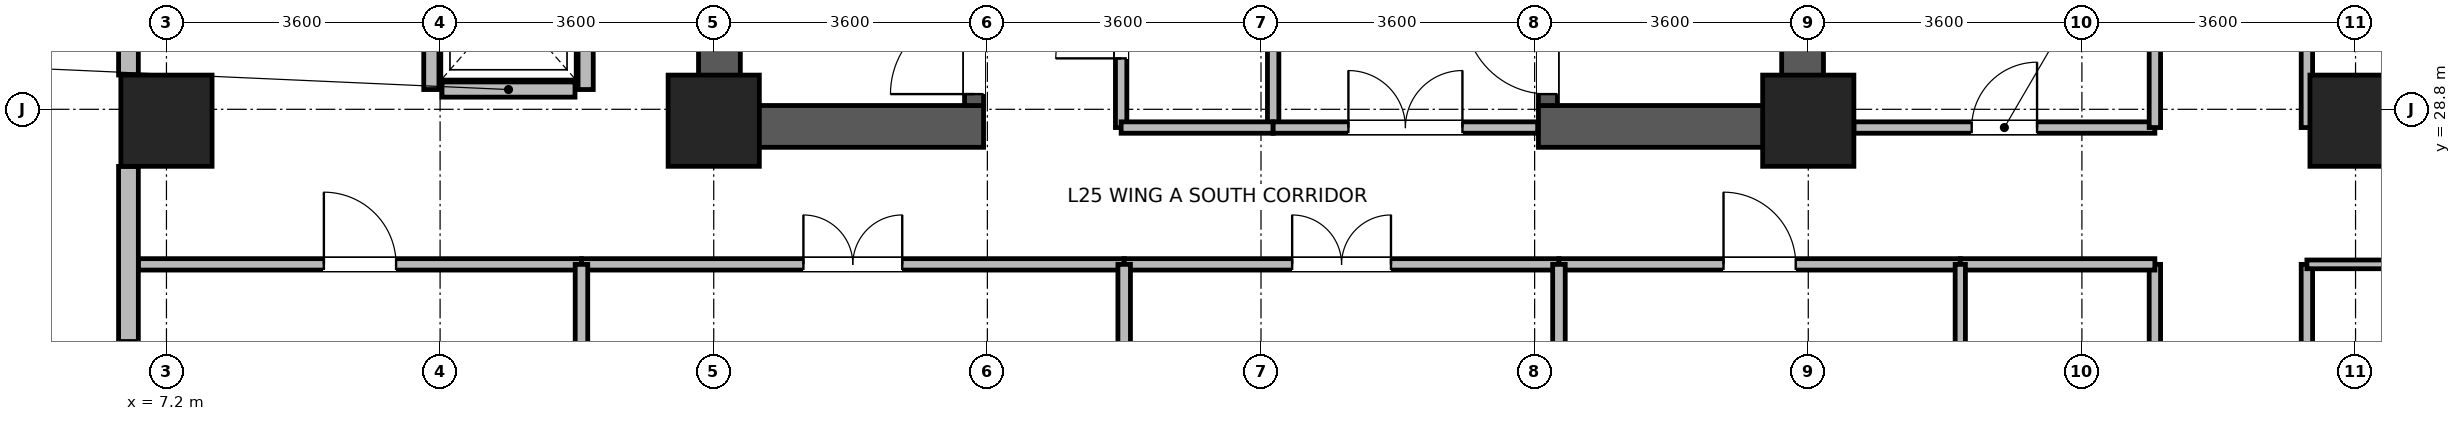
"""IFC4 building model, lengths in metres.
Left out: names, types, materials, properties, quantities, classifications, styles, units other than length and angle.
Written with IfcOpenShell. Run it as: python <this file> out.ifc"""

import sys

from ifc_helpers import new_model, si_unit, direction, frame, frame_2d, origin, origin_2d, place, context, subcontext, project, spatial, rectangle, extrude, source, transform, mapped, element, fill, save


model = new_model("IFC4")
c1 = context("Model", 3, precision=1e-05, world=origin(), true_north=direction((0.0, 1.0)))
c2 = subcontext(c1, "Body", "Model", "MODEL_VIEW")
j1 = project(units=[si_unit("LENGTHUNIT", "METRE"), si_unit("PLANEANGLEUNIT", "RADIAN")], contexts=[c1])
p1 = place(None, origin())
s1 = spatial("IfcSite", under=j1, at=p1, CompositionType="ELEMENT")
p2 = place(p1, origin())
s2 = spatial("IfcBuilding", under=s1, at=p2, CompositionType="ELEMENT")
p3 = place(p2, frame((0.0, 0.0, 100.8)))
s3 = spatial("IfcBuildingStorey", under=s2, at=p3, CompositionType="ELEMENT", Elevation=100.8)
for number, where, z_axis, x_axis in (
    (1, (14.475, 28.3, 0.0), (0.0, 0.0, 1.0), (0.0, 1.0, 0.0)),
    (2, (28.725, 28.3, 0.0), (0.0, 0.0, 1.0), (0.0, 1.0, 0.0)),
):
    element("IfcWall", number, at=place(p3, frame(where, z_axis=z_axis, x_axis=x_axis)), inside=s3, PredefinedType="SHEAR", context=c2, shape_type="SweptSolid", body=[
        extrude(rectangle(XDim=8.1, YDim=0.55, at=frame_2d((4.05, 0.0))), origin(), (0.0, 0.0, 1.0), 3.45),
    ])
for number, where, z_axis, x_axis in (
    (3, (14.75, 28.575, 0.0), (0.0, 0.0, 1.0), (1.0, 0.0, 0.0)),
    (4, (25.25, 28.575, 0.0), (0.0, 0.0, 1.0), (1.0, 0.0, 0.0)),
):
    element("IfcWall", number, at=place(p3, frame(where, z_axis=z_axis, x_axis=x_axis)), inside=s3, PredefinedType="SHEAR", context=c2, shape_type="SweptSolid", body=[
        extrude(rectangle(XDim=3.2, YDim=0.55, at=frame_2d((1.6, 0.0))), origin(), (0.0, 0.0, 1.0), 3.45),
    ])
p4 = place(p3, frame((17.825, 28.85, 0.0), z_axis=(0.0, 0.0, 1.0), x_axis=(0.0, 1.0, 0.0)))
e5 = element("IfcWall", 5, at=p4, inside=s3, PredefinedType="SHEAR", context=c2, shape_type="SweptSolid", body=[
    extrude(rectangle(XDim=7.0, YDim=0.25, at=frame_2d((3.5, 0.0))), origin(), (0.0, 0.0, 1.0), 3.45),
])
p5 = place(p4, frame((0.15, 0.0, 0.0)))
e6 = element("IfcOpeningElement", 6, at=p5, cuts=e5, PredefinedType="OPENING", context=c2, shape_type="SweptSolid", body=[
    extrude(rectangle(XDim=1.1, YDim=2.08, at=frame_2d((0.55, 1.04))), frame((0.0, 0.135, 0.0), z_axis=(0.0, -1.0, 0.0), x_axis=(1.0, 0.0, 0.0)), (0.0, 0.0, 1.0), 0.27),
])
p6 = place(p3, frame((25.375, 28.85, 0.0), z_axis=(0.0, 0.0, 1.0), x_axis=(0.0, 1.0, 0.0)))
e7 = element("IfcWall", 7, at=p6, inside=s3, PredefinedType="SHEAR", context=c2, shape_type="SweptSolid", body=[
    extrude(rectangle(XDim=7.0, YDim=0.25, at=frame_2d((3.5, 0.0))), origin(), (0.0, 0.0, 1.0), 3.45),
])
p7 = place(p6, frame((0.15, 0.0, 0.0)))
e8 = element("IfcOpeningElement", 8, at=p7, cuts=e7, PredefinedType="OPENING", context=c2, shape_type="SweptSolid", body=[
    extrude(rectangle(XDim=1.1, YDim=2.08, at=frame_2d((0.55, 1.04))), frame((0.0, 0.135, 0.0), z_axis=(0.0, -1.0, 0.0), x_axis=(1.0, 0.0, 0.0)), (0.0, 0.0, 1.0), 0.27),
])
m1 = source(origin(), c2, "Body", "SweptSolid", [
    extrude(rectangle(XDim=1.2, YDim=1.2, at=origin_2d()), origin(), (0.0, 0.0, 1.0), 3.7),
])
for number, where, z_axis, x_axis in (
    (9, (7.2, 28.65, 0.0), (0.0, 0.0, 1.0), (1.0, 0.0, 0.0)),
    (10, (14.4, 28.65, 0.0), (0.0, 0.0, 1.0), (1.0, 0.0, 0.0)),
    (11, (28.8, 28.65, 0.0), (0.0, 0.0, 1.0), (1.0, 0.0, 0.0)),
    (12, (36.0, 28.65, 0.0), (0.0, 0.0, 1.0), (1.0, 0.0, 0.0)),
):
    element("IfcColumn", number, at=place(p3, frame(where, z_axis=z_axis, x_axis=x_axis)), inside=s3, PredefinedType="COLUMN", context=c2, shape_type="MappedRepresentation", body=[
        mapped(m1, transform((0.0, 0.0, 0.0), x_axis=(1.0, 0.0, 0.0), y_axis=(0.0, 1.0, 0.0), z_axis=(0.0, 0.0, 1.0), scale=1.0)),
    ])
p8 = place(p3, frame((6.7, 29.251, 0.0), z_axis=(0.0, 0.0, 1.0), x_axis=(0.0, 1.0, 0.0)))
e13 = element("IfcWall", 13, at=p8, inside=s3, PredefinedType="STANDARD", context=c2, shape_type="SweptSolid", body=[
    extrude(rectangle(XDim=6.298, YDim=0.26, at=frame_2d((3.149, 0.0))), origin(), (0.0, 0.0, 1.0), 3.43),
])
p9 = place(p8, frame((0.675, 0.0, 0.85)))
e14 = element("IfcOpeningElement", 14, at=p9, cuts=e13, PredefinedType="OPENING", context=c2, shape_type="SweptSolid", body=[
    extrude(rectangle(XDim=1.8, YDim=1.85, at=frame_2d((0.9, 0.925))), frame((0.0, 0.14, 0.0), z_axis=(0.0, -1.0, 0.0), x_axis=(1.0, 0.0, 0.0)), (0.0, 0.0, 1.0), 0.28),
])
p10 = place(p8, frame((3.823, 0.0, 0.85)))
e15 = element("IfcOpeningElement", 15, at=p10, cuts=e13, PredefinedType="OPENING", context=c2, shape_type="SweptSolid", body=[
    extrude(rectangle(XDim=1.8, YDim=1.85, at=frame_2d((0.9, 0.925))), frame((0.0, 0.14, 0.0), z_axis=(0.0, -1.0, 0.0), x_axis=(1.0, 0.0, 0.0)), (0.0, 0.0, 1.0), 0.28),
])
p11 = place(p3, frame((6.7, 21.47, 0.0), z_axis=(0.0, 0.0, 1.0), x_axis=(0.0, 1.0, 0.0)))
e16 = element("IfcWall", 16, at=p11, inside=s3, PredefinedType="STANDARD", context=c2, shape_type="SweptSolid", body=[
    extrude(rectangle(XDim=6.579, YDim=0.26, at=frame_2d((3.29, 0.0))), origin(), (0.0, 0.0, 1.0), 3.43),
])
p12 = place(p11, frame((0.745, 0.0, 0.85)))
e17 = element("IfcOpeningElement", 17, at=p12, cuts=e16, PredefinedType="OPENING", context=c2, shape_type="SweptSolid", body=[
    extrude(rectangle(XDim=1.8, YDim=1.85, at=frame_2d((0.9, 0.925))), frame((0.0, 0.14, 0.0), z_axis=(0.0, -1.0, 0.0), x_axis=(1.0, 0.0, 0.0)), (0.0, 0.0, 1.0), 0.28),
])
p13 = place(p11, frame((3.341, 0.0, 0.85)))
e18 = element("IfcOpeningElement", 18, at=p13, cuts=e16, PredefinedType="OPENING", context=c2, shape_type="SweptSolid", body=[
    extrude(rectangle(XDim=0.95, YDim=1.75, at=frame_2d((0.475, 0.875))), frame((0.0, 0.14, 0.0), z_axis=(0.0, -1.0, 0.0), x_axis=(1.0, 0.0, 0.0)), (0.0, 0.0, 1.0), 0.28),
])
p14 = place(p3, frame((10.825, 29.06, 0.0), z_axis=(0.0, 0.0, 1.0), x_axis=(1.0, 0.0, 0.0)))
e19 = element("IfcWall", 19, at=p14, inside=s3, PredefinedType="PARTITIONING", context=c2, shape_type="SweptSolid", body=[
    extrude(rectangle(XDim=1.75, YDim=0.2, at=frame_2d((0.875, 0.0))), origin(), (0.0, 0.0, 1.0), 3.43),
])
for number, where, z_axis, x_axis in (
    (20, (10.685, 29.06, 0.0), (0.0, 0.0, 1.0), (0.0, 1.0, 0.0)),
    (21, (12.715, 29.06, 0.0), (0.0, 0.0, 1.0), (0.0, 1.0, 0.0)),
):
    element("IfcWall", number, at=place(p3, frame(where, z_axis=z_axis, x_axis=x_axis)), inside=s3, PredefinedType="PARTITIONING", context=c2, shape_type="SweptSolid", body=[
        extrude(rectangle(XDim=2.28, YDim=0.2, at=frame_2d((1.14, 0.0))), origin(), (0.0, 0.0, 1.0), 3.43),
    ])
p15 = place(p3, frame((35.36, 16.96, 0.0), z_axis=(0.0, 0.0, 1.0), x_axis=(0.0, 1.0, 0.0)))
e22 = element("IfcWall", 22, at=p15, inside=s3, PredefinedType="PARTITIONING", context=c2, shape_type="SweptSolid", body=[
    extrude(rectangle(XDim=9.8, YDim=0.15, at=frame_2d((4.9, 0.0))), origin(), (0.0, 0.0, 1.0), 3.43),
])
p16 = place(p15, frame((2.486, 0.0, 0.0)))
e23 = element("IfcOpeningElement", 23, at=p16, cuts=e22, PredefinedType="OPENING", context=c2, shape_type="SweptSolid", body=[
    extrude(rectangle(XDim=1.3, YDim=2.12, at=frame_2d((0.65, 1.06))), frame((0.0, 0.085, 0.0), z_axis=(0.0, -1.0, 0.0), x_axis=(1.0, 0.0, 0.0)), (0.0, 0.0, 1.0), 0.17),
])
p17 = place(p3, frame((35.36, 28.56, 0.0), z_axis=(0.0, 0.0, 1.0), x_axis=(0.0, 1.0, 0.0)))
e24 = element("IfcWall", 24, at=p17, inside=s3, PredefinedType="PARTITIONING", context=c2, shape_type="SweptSolid", body=[
    extrude(rectangle(XDim=7.68, YDim=0.15, at=frame_2d((3.84, 0.0))), origin(), (0.0, 0.0, 1.0), 3.43),
])
p18 = place(p17, frame((3.19, 0.0, 0.0)))
e25 = element("IfcOpeningElement", 25, at=p18, cuts=e24, PredefinedType="OPENING", context=c2, shape_type="SweptSolid", body=[
    extrude(rectangle(XDim=1.3, YDim=2.12, at=frame_2d((0.65, 1.06))), frame((0.0, 0.085, 0.0), z_axis=(0.0, -1.0, 0.0), x_axis=(1.0, 0.0, 0.0)), (0.0, 0.0, 1.0), 0.17),
])
p19 = place(p3, frame((12.66, 26.76, 0.0), z_axis=(0.0, 0.0, 1.0), x_axis=(1.0, 0.0, 0.0)))
e26 = element("IfcWall", 26, at=p19, inside=s3, PredefinedType="PARTITIONING", context=c2, shape_type="SweptSolid", body=[
    extrude(rectangle(XDim=7.14, YDim=0.15, at=frame_2d((3.57, 0.0))), origin(), (0.0, 0.0, 1.0), 3.43),
])
p20 = place(p19, frame((2.92, 0.0, 0.0)))
e27 = element("IfcOpeningElement", 27, at=p20, cuts=e26, PredefinedType="OPENING", context=c2, shape_type="SweptSolid", body=[
    extrude(rectangle(XDim=1.3, YDim=2.12, at=frame_2d((0.65, 1.06))), frame((0.0, 0.085, 0.0), z_axis=(0.0, -1.0, 0.0), x_axis=(1.0, 0.0, 0.0)), (0.0, 0.0, 1.0), 0.17),
])
p21 = place(p3, frame((6.832, 26.76, 0.0), z_axis=(0.0, 0.0, 1.0), x_axis=(1.0, 0.0, 0.0)))
e28 = element("IfcWall", 28, at=p21, inside=s3, PredefinedType="PARTITIONING", context=c2, shape_type="SweptSolid", body=[
    extrude(rectangle(XDim=5.828, YDim=0.15, at=frame_2d((2.914, 0.0))), origin(), (0.0, 0.0, 1.0), 3.43),
])
p22 = place(p21, frame((2.439, 0.0, 0.0)))
e29 = element("IfcOpeningElement", 29, at=p22, cuts=e28, PredefinedType="OPENING", context=c2, shape_type="SweptSolid", body=[
    extrude(rectangle(XDim=0.95, YDim=2.1, at=frame_2d((0.475, 1.05))), frame((0.0, 0.085, 0.0), z_axis=(0.0, -1.0, 0.0), x_axis=(1.0, 0.0, 0.0)), (0.0, 0.0, 1.0), 0.17),
])
p23 = place(p3, frame((19.8, 26.76, 0.0), z_axis=(0.0, 0.0, 1.0), x_axis=(1.0, 0.0, 0.0)))
e30 = element("IfcWall", 30, at=p23, inside=s3, PredefinedType="PARTITIONING", context=c2, shape_type="SweptSolid", body=[
    extrude(rectangle(XDim=5.72, YDim=0.15, at=frame_2d((2.86, 0.0))), origin(), (0.0, 0.0, 1.0), 3.43),
])
p24 = place(p23, frame((2.21, 0.0, 0.0)))
e31 = element("IfcOpeningElement", 31, at=p24, cuts=e30, PredefinedType="OPENING", context=c2, shape_type="SweptSolid", body=[
    extrude(rectangle(XDim=1.3, YDim=2.12, at=frame_2d((0.65, 1.06))), frame((0.0, 0.085, 0.0), z_axis=(0.0, -1.0, 0.0), x_axis=(1.0, 0.0, 0.0)), (0.0, 0.0, 1.0), 0.17),
])
p25 = place(p3, frame((25.52, 26.76, 0.0), z_axis=(0.0, 0.0, 1.0), x_axis=(1.0, 0.0, 0.0)))
e32 = element("IfcWall", 32, at=p25, inside=s3, PredefinedType="PARTITIONING", context=c2, shape_type="SweptSolid", body=[
    extrude(rectangle(XDim=5.28, YDim=0.15, at=frame_2d((2.64, 0.0))), origin(), (0.0, 0.0, 1.0), 3.43),
])
p26 = place(p25, frame((2.165, 0.0, 0.0)))
e33 = element("IfcOpeningElement", 33, at=p26, cuts=e32, PredefinedType="OPENING", context=c2, shape_type="SweptSolid", body=[
    extrude(rectangle(XDim=0.95, YDim=2.1, at=frame_2d((0.475, 1.05))), frame((0.0, 0.085, 0.0), z_axis=(0.0, -1.0, 0.0), x_axis=(1.0, 0.0, 0.0)), (0.0, 0.0, 1.0), 0.17),
])
p27 = place(p3, frame((33.36, 21.6, 0.0), z_axis=(0.0, 0.0, 1.0), x_axis=(0.0, 1.0, 0.0)))
e34 = element("IfcWall", 34, at=p27, inside=s3, PredefinedType="PARTITIONING", context=c2, shape_type="SweptSolid", body=[
    extrude(rectangle(XDim=5.16, YDim=0.15, at=frame_2d((2.58, 0.0))), origin(), (0.0, 0.0, 1.0), 3.43),
])
p28 = place(p27, frame((2.155, 0.0, 0.0)))
e35 = element("IfcOpeningElement", 35, at=p28, cuts=e34, PredefinedType="OPENING", context=c2, shape_type="SweptSolid", body=[
    extrude(rectangle(XDim=0.85, YDim=2.04, at=frame_2d((0.425, 1.02))), frame((0.0, 0.085, 0.0), z_axis=(0.0, -1.0, 0.0), x_axis=(1.0, 0.0, 0.0)), (0.0, 0.0, 1.0), 0.17),
])
p29 = place(p3, frame((29.4, 28.56, 0.0), z_axis=(0.0, 0.0, 1.0), x_axis=(1.0, 0.0, 0.0)))
e36 = element("IfcWall", 36, at=p29, inside=s3, PredefinedType="PARTITIONING", context=c2, shape_type="SweptSolid", body=[
    extrude(rectangle(XDim=3.96, YDim=0.15, at=frame_2d((1.98, 0.0))), origin(), (0.0, 0.0, 1.0), 2.78),
])
p30 = place(p29, frame((1.55, 0.0, 0.0)))
e37 = element("IfcOpeningElement", 37, at=p30, cuts=e36, PredefinedType="OPENING", context=c2, shape_type="SweptSolid", body=[
    extrude(rectangle(XDim=0.86, YDim=2.02, at=frame_2d((0.43, 1.01))), frame((0.0, 0.085, 0.0), z_axis=(0.0, -1.0, 0.0), x_axis=(1.0, 0.0, 0.0)), (0.0, 0.0, 1.0), 0.17),
])
p31 = place(p3, frame((33.36, 28.56, 0.0), z_axis=(0.0, 0.0, 1.0), x_axis=(0.0, 1.0, 0.0)))
e38 = element("IfcWall", 38, at=p31, inside=s3, PredefinedType="PARTITIONING", context=c2, shape_type="SweptSolid", body=[
    extrude(rectangle(XDim=3.08, YDim=0.15, at=frame_2d((1.54, 0.0))), origin(), (0.0, 0.0, 1.0), 3.43),
])
p32 = place(p3, frame((19.76, 28.56, 0.0), z_axis=(0.0, 0.0, 1.0), x_axis=(0.0, 1.0, 0.0)))
e39 = element("IfcWall", 39, at=p32, inside=s3, PredefinedType="PARTITIONING", context=c2, shape_type="SweptSolid", body=[
    extrude(rectangle(XDim=2.68, YDim=0.15, at=frame_2d((1.34, 0.0))), origin(), (0.0, 0.0, 1.0), 3.43),
])
p33 = place(p32, frame((0.91, 0.0, 0.0)))
e40 = element("IfcOpeningElement", 40, at=p33, cuts=e39, PredefinedType="OPENING", context=c2, shape_type="SweptSolid", body=[
    extrude(rectangle(XDim=0.86, YDim=2.02, at=frame_2d((0.43, 1.01))), frame((0.0, 0.085, 0.0), z_axis=(0.0, -1.0, 0.0), x_axis=(1.0, 0.0, 0.0)), (0.0, 0.0, 1.0), 0.17),
])
p34 = place(p3, frame((21.76, 28.56, 0.0), z_axis=(0.0, 0.0, 1.0), x_axis=(0.0, 1.0, 0.0)))
e41 = element("IfcWall", 41, at=p34, inside=s3, PredefinedType="PARTITIONING", context=c2, shape_type="SweptSolid", body=[
    extrude(rectangle(XDim=2.68, YDim=0.15, at=frame_2d((1.34, 0.0))), origin(), (0.0, 0.0, 1.0), 3.43),
])
p35 = place(p3, frame((30.8, 26.76, 0.0), z_axis=(0.0, 0.0, 1.0), x_axis=(1.0, 0.0, 0.0)))
e42 = element("IfcWall", 42, at=p35, inside=s3, PredefinedType="PARTITIONING", context=c2, shape_type="SweptSolid", body=[
    extrude(rectangle(XDim=2.56, YDim=0.15, at=frame_2d((1.28, 0.0))), origin(), (0.0, 0.0, 1.0), 3.43),
])
p36 = place(p3, frame((19.76, 28.56, 0.0), z_axis=(0.0, 0.0, 1.0), x_axis=(1.0, 0.0, 0.0)))
e43 = element("IfcWall", 43, at=p36, inside=s3, PredefinedType="PARTITIONING", context=c2, shape_type="SweptSolid", body=[
    extrude(rectangle(XDim=2.0, YDim=0.15, at=frame_2d((1.0, 0.0))), origin(), (0.0, 0.0, 1.0), 2.43),
])
p37 = place(p3, frame((35.36, 26.76, 0.0), z_axis=(0.0, 0.0, 1.0), x_axis=(1.0, 0.0, 0.0)))
e44 = element("IfcWall", 44, at=p37, inside=s3, PredefinedType="PARTITIONING", context=c2, shape_type="SweptSolid", body=[
    extrude(rectangle(XDim=5.86, YDim=0.115, at=frame_2d((2.93, 0.0))), origin(), (0.0, 0.0, 1.0), 3.43),
])
for number, where, z_axis, x_axis in (
    (45, (19.8, 21.732, 0.0), (0.0, 0.0, 1.0), (0.0, 1.0, 0.0)),
    (46, (25.52, 21.732, 0.0), (0.0, 0.0, 1.0), (0.0, 1.0, 0.0)),
):
    element("IfcWall", number, at=place(p3, frame(where, z_axis=z_axis, x_axis=x_axis)), inside=s3, PredefinedType="PARTITIONING", context=c2, shape_type="SweptSolid", body=[
        extrude(rectangle(XDim=5.028, YDim=0.165, at=frame_2d((2.514, 0.0))), origin(), (0.0, 0.0, 1.0), 3.43),
    ])
p38 = place(p3, frame((30.8, 21.732, 0.0), z_axis=(0.0, 0.0, 1.0), x_axis=(0.0, 1.0, 0.0)))
e47 = element("IfcWall", 47, at=p38, inside=s3, PredefinedType="PARTITIONING", context=c2, shape_type="SweptSolid", body=[
    extrude(rectangle(XDim=5.028, YDim=0.135, at=frame_2d((2.514, 0.0))), origin(), (0.0, 0.0, 1.0), 3.43),
])
p39 = place(p3, frame((21.76, 28.56, 0.0), z_axis=(0.0, 0.0, 1.0), x_axis=(1.0, 0.0, 0.0)))
e48 = element("IfcWall", 48, at=p39, inside=s3, PredefinedType="PARTITIONING", context=c2, shape_type="SweptSolid", body=[
    extrude(rectangle(XDim=3.48, YDim=0.15, at=frame_2d((1.74, 0.0))), origin(), (0.0, 0.0, 1.0), 2.43),
])
p40 = place(p39, frame((0.99, 0.0, 0.0)))
e49 = element("IfcOpeningElement", 49, at=p40, cuts=e48, PredefinedType="OPENING", context=c2, shape_type="SweptSolid", body=[
    extrude(rectangle(XDim=1.5, YDim=2.1, at=frame_2d((0.75, 1.05))), frame((0.0, 0.085, 0.0), z_axis=(0.0, -1.0, 0.0), x_axis=(1.0, 0.0, 0.0)), (0.0, 0.0, 1.0), 0.17),
])
p41 = place(p3, frame((12.66, 23.5, 0.0), z_axis=(0.0, 0.0, 1.0), x_axis=(0.0, 1.0, 0.0)))
e50 = element("IfcWall", 50, at=p41, inside=s3, PredefinedType="PARTITIONING", context=c2, shape_type="SweptSolid", body=[
    extrude(rectangle(XDim=3.26, YDim=0.165, at=frame_2d((1.63, 0.0))), origin(), (0.0, 0.0, 1.0), 3.43),
])
p42 = place(p13, origin())
e51 = element("IfcWindow", 51, at=p42, inside=s3, PartitioningType="SINGLE_PANEL", PredefinedType="WINDOW", context=c2, shape_type="SweptSolid", body=[
    extrude(rectangle(XDim=0.95, YDim=1.75, at=frame_2d((0.475, 0.875))), frame((0.0, 0.03, 0.0), z_axis=(0.0, -1.0, 0.0), x_axis=(1.0, 0.0, 0.0)), (0.0, 0.0, 1.0), 0.06),
])
fill(e18, e51)
p43 = place(p5, origin())
e52 = element("IfcDoor", 52, at=p43, inside=s3, OperationType="SINGLE_SWING_LEFT", PredefinedType="DOOR", context=c2, shape_type="SweptSolid", body=[
    extrude(rectangle(XDim=1.1, YDim=2.08, at=frame_2d((0.55, 1.04))), frame((0.0, 0.025, 0.0), z_axis=(0.0, -1.0, 0.0), x_axis=(1.0, 0.0, 0.0)), (0.0, 0.0, 1.0), 0.05),
])
fill(e6, e52)
p44 = place(p7, origin())
e53 = element("IfcDoor", 53, at=p44, inside=s3, OperationType="SINGLE_SWING_RIGHT", PredefinedType="DOOR", context=c2, shape_type="SweptSolid", body=[
    extrude(rectangle(XDim=1.1, YDim=2.08, at=frame_2d((0.55, 1.04))), frame((0.0, 0.025, 0.0), z_axis=(0.0, -1.0, 0.0), x_axis=(1.0, 0.0, 0.0)), (0.0, 0.0, 1.0), 0.05),
])
fill(e8, e53)
p45 = place(p20, origin())
e54 = element("IfcDoor", 54, at=p45, inside=s3, OperationType="DOUBLE_DOOR_SINGLE_SWING", PredefinedType="DOOR", context=c2, shape_type="SweptSolid", body=[
    extrude(rectangle(XDim=1.3, YDim=2.12, at=frame_2d((0.65, 1.06))), frame((0.0, 0.025, 0.0), z_axis=(0.0, -1.0, 0.0), x_axis=(1.0, 0.0, 0.0)), (0.0, 0.0, 1.0), 0.05),
])
fill(e27, e54)
p46 = place(p22, origin())
e55 = element("IfcDoor", 55, at=p46, inside=s3, OperationType="SINGLE_SWING_LEFT", PredefinedType="DOOR", context=c2, shape_type="SweptSolid", body=[
    extrude(rectangle(XDim=0.95, YDim=2.1, at=frame_2d((0.475, 1.05))), frame((0.0, 0.025, 0.0), z_axis=(0.0, -1.0, 0.0), x_axis=(1.0, 0.0, 0.0)), (0.0, 0.0, 1.0), 0.05),
])
fill(e29, e55)
p47 = place(p24, origin())
e56 = element("IfcDoor", 56, at=p47, inside=s3, OperationType="DOUBLE_DOOR_SINGLE_SWING", PredefinedType="DOOR", context=c2, shape_type="SweptSolid", body=[
    extrude(rectangle(XDim=1.3, YDim=2.12, at=frame_2d((0.65, 1.06))), frame((0.0, 0.025, 0.0), z_axis=(0.0, -1.0, 0.0), x_axis=(1.0, 0.0, 0.0)), (0.0, 0.0, 1.0), 0.05),
])
fill(e31, e56)
p48 = place(p26, origin())
e57 = element("IfcDoor", 57, at=p48, inside=s3, OperationType="SINGLE_SWING_LEFT", PredefinedType="DOOR", context=c2, shape_type="SweptSolid", body=[
    extrude(rectangle(XDim=0.95, YDim=2.1, at=frame_2d((0.475, 1.05))), frame((0.0, 0.025, 0.0), z_axis=(0.0, -1.0, 0.0), x_axis=(1.0, 0.0, 0.0)), (0.0, 0.0, 1.0), 0.05),
])
fill(e33, e57)
p49 = place(p30, origin())
e58 = element("IfcDoor", 58, at=p49, inside=s3, OperationType="SINGLE_SWING_RIGHT", PredefinedType="DOOR", context=c2, shape_type="SweptSolid", body=[
    extrude(rectangle(XDim=0.86, YDim=2.02, at=frame_2d((0.43, 1.01))), frame((0.0, 0.025, 0.0), z_axis=(0.0, -1.0, 0.0), x_axis=(1.0, 0.0, 0.0)), (0.0, 0.0, 1.0), 0.05),
])
fill(e37, e58)
p50 = place(p33, origin())
e59 = element("IfcDoor", 59, at=p50, inside=s3, OperationType="SINGLE_SWING_LEFT", PredefinedType="DOOR", context=c2, shape_type="SweptSolid", body=[
    extrude(rectangle(XDim=0.86, YDim=2.02, at=frame_2d((0.43, 1.01))), frame((0.0, 0.025, 0.0), z_axis=(0.0, -1.0, 0.0), x_axis=(1.0, 0.0, 0.0)), (0.0, 0.0, 1.0), 0.05),
])
fill(e40, e59)
p51 = place(p40, origin())
e60 = element("IfcDoor", 60, at=p51, inside=s3, OperationType="DOUBLE_DOOR_SINGLE_SWING", PredefinedType="DOOR", context=c2, shape_type="SweptSolid", body=[
    extrude(rectangle(XDim=1.5, YDim=2.1, at=frame_2d((0.75, 1.05))), frame((0.0, 0.025, 0.0), z_axis=(0.0, -1.0, 0.0), x_axis=(1.0, 0.0, 0.0)), (0.0, 0.0, 1.0), 0.05),
])
fill(e49, e60)
save(model, sys.argv[1])
